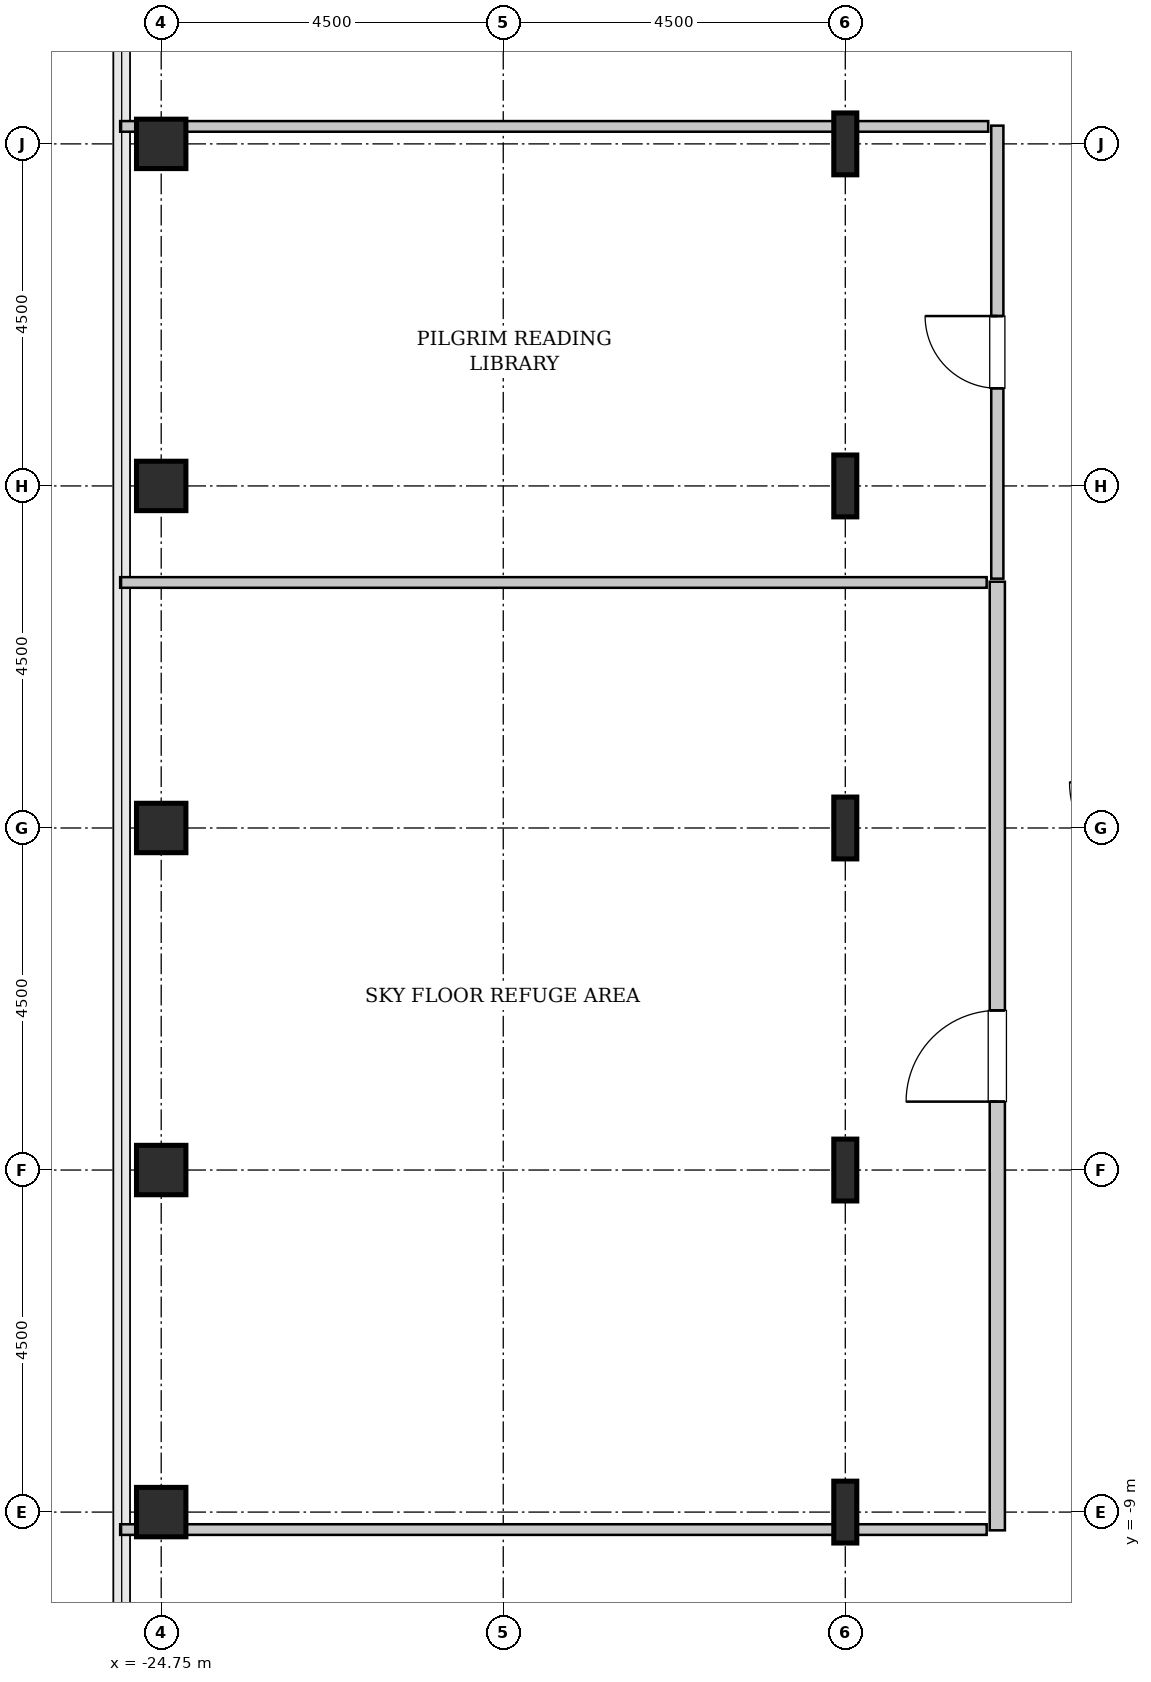
"""IFC4 building model, lengths in metres.
Left out: names, types, materials, properties, quantities, classifications, styles, units other than length and angle.
Written with IfcOpenShell. Run it as: python <this file> out.ifc"""

import sys

from ifc_helpers import new_model, si_unit, direction, frame, frame_2d, origin, origin_2d, place, context, subcontext, project, spatial, rectangle, hollow_rectangle, i_section, extrude, source, transform, mapped, element, fill, save


model = new_model("IFC4")
c1 = context("Model", 3, precision=1e-05, world=origin(), true_north=direction((0.0, 1.0)))
c2 = subcontext(c1, "Body", "Model", "MODEL_VIEW")
j1 = project(units=[si_unit("LENGTHUNIT", "METRE"), si_unit("PLANEANGLEUNIT", "RADIAN")], contexts=[c1])
p1 = place(None, origin())
s1 = spatial("IfcSite", under=j1, at=p1, CompositionType="ELEMENT")
p2 = place(p1, origin())
s2 = spatial("IfcBuilding", under=s1, at=p2, CompositionType="ELEMENT")
p3 = place(p2, frame((0.0, 0.0, 259.8)))
s3 = spatial("IfcBuildingStorey", under=s2, at=p3, CompositionType="ELEMENT", Elevation=259.8)
m1 = source(origin(), c2, "Body", "SweptSolid", [
    extrude(hollow_rectangle(XDim=0.65, YDim=0.65, WallThickness=0.032, InnerFilletRadius=0.032, OuterFilletRadius=0.064, at=origin_2d()), origin(), (0.0, 0.0, 1.0), 4.8),
])
for number, where, z_axis, x_axis in (
    (1, (-24.75, -9.0, 0.0), (0.0, 0.0, 1.0), (1.0, 0.0, 0.0)),
    (2, (-24.75, -4.5, 0.0), (0.0, 0.0, 1.0), (1.0, 0.0, 0.0)),
    (3, (-24.75, 0.0, 0.0), (0.0, 0.0, 1.0), (1.0, 0.0, 0.0)),
    (4, (-24.75, 4.5, 0.0), (0.0, 0.0, 1.0), (1.0, 0.0, 0.0)),
    (5, (-24.75, 9.0, 0.0), (0.0, 0.0, 1.0), (1.0, 0.0, 0.0)),
):
    element("IfcColumn", number, at=place(p3, frame(where, z_axis=z_axis, x_axis=x_axis)), inside=s3, PredefinedType="COLUMN", context=c2, shape_type="MappedRepresentation", body=[
        mapped(m1, transform((0.0, 0.0, 0.0), x_axis=(1.0, 0.0, 0.0), y_axis=(0.0, 1.0, 0.0), z_axis=(0.0, 0.0, 1.0), scale=1.0)),
    ])
m2 = source(origin(), c2, "Body", "SweptSolid", [
    extrude(i_section(OverallWidth=0.303, OverallDepth=0.814, WebThickness=0.021, FlangeThickness=0.04, FilletRadius=0.03, at=origin_2d()), origin(), (0.0, 0.0, 1.0), 4.8),
])
for number, where, z_axis, x_axis in (
    (6, (-15.75, -9.0, 0.0), (0.0, 0.0, 1.0), (1.0, 0.0, 0.0)),
    (7, (-15.75, -4.5, 0.0), (0.0, 0.0, 1.0), (1.0, 0.0, 0.0)),
    (8, (-15.75, 0.0, 0.0), (0.0, 0.0, 1.0), (1.0, 0.0, 0.0)),
    (9, (-15.75, 4.5, 0.0), (0.0, 0.0, 1.0), (1.0, 0.0, 0.0)),
    (10, (-15.75, 9.0, 0.0), (0.0, 0.0, 1.0), (1.0, 0.0, 0.0)),
):
    element("IfcColumn", number, at=place(p3, frame(where, z_axis=z_axis, x_axis=x_axis)), inside=s3, PredefinedType="COLUMN", context=c2, shape_type="MappedRepresentation", body=[
        mapped(m2, transform((0.0, 0.0, 0.0), x_axis=(1.0, 0.0, 0.0), y_axis=(0.0, 1.0, 0.0), z_axis=(0.0, 0.0, 1.0), scale=1.0)),
    ])
m3 = source(origin(), c2, "Body", "SweptSolid", [
    extrude(rectangle(XDim=12.48, YDim=0.2, at=frame_2d((6.24, 0.0))), origin(), (0.0, 0.0, 1.0), 4.535),
])
p4 = place(p3, frame((-13.75, -9.24, 0.0), z_axis=(0.0, 0.0, 1.0), x_axis=(0.0, 1.0, 0.0)))
e11 = element("IfcWall", 11, at=p4, inside=s3, PredefinedType="SOLIDWALL", context=c2, shape_type="MappedRepresentation", body=[
    mapped(m3, transform((0.0, 0.0, 0.0), x_axis=(1.0, 0.0, 0.0), y_axis=(0.0, 1.0, 0.0), z_axis=(0.0, 0.0, 1.0), scale=1.0)),
])
p5 = place(p4, frame((5.64, 0.0, 0.0)))
e12 = element("IfcOpeningElement", 12, at=p5, cuts=e11, PredefinedType="OPENING", context=c2, shape_type="SweptSolid", body=[
    extrude(rectangle(XDim=1.2, YDim=2.15, at=frame_2d((0.6, 1.075))), frame((0.0, 0.11, 0.0), z_axis=(0.0, -1.0, 0.0), x_axis=(1.0, 0.0, 0.0)), (0.0, 0.0, 1.0), 0.22),
])
m4 = source(origin(), c2, "Body", "SweptSolid", [
    extrude(rectangle(XDim=11.4, YDim=0.14, at=frame_2d((5.7, 0.0))), origin(), (0.0, 0.0, 1.0), 3.925),
])
p6 = place(p3, frame((-25.29, -9.23, 0.0), z_axis=(0.0, 0.0, 1.0), x_axis=(1.0, 0.0, 0.0)))
e13 = element("IfcWall", 13, at=p6, inside=s3, PredefinedType="PARTITIONING", context=c2, shape_type="MappedRepresentation", body=[
    mapped(m4, transform((0.0, 0.0, 0.0), x_axis=(1.0, 0.0, 0.0), y_axis=(0.0, 1.0, 0.0), z_axis=(0.0, 0.0, 1.0), scale=1.0)),
])
m5 = source(origin(), c2, "Body", "SweptSolid", [
    extrude(rectangle(XDim=11.4, YDim=0.14, at=frame_2d((5.7, 0.0))), origin(), (0.0, 0.0, 1.0), 4.535),
])
p7 = place(p3, frame((-25.29, 3.23, 0.0), z_axis=(0.0, 0.0, 1.0), x_axis=(1.0, 0.0, 0.0)))
e14 = element("IfcWall", 14, at=p7, inside=s3, PredefinedType="PARTITIONING", context=c2, shape_type="MappedRepresentation", body=[
    mapped(m5, transform((0.0, 0.0, 0.0), x_axis=(1.0, 0.0, 0.0), y_axis=(0.0, 1.0, 0.0), z_axis=(0.0, 0.0, 1.0), scale=1.0)),
])
m6 = source(origin(), c2, "Body", "SweptSolid", [
    extrude(rectangle(XDim=5.96, YDim=0.16, at=frame_2d((2.98, 0.0))), origin(), (0.0, 0.0, 1.0), 4.535),
])
p8 = place(p3, frame((-13.75, 3.28, 0.0), z_axis=(0.0, 0.0, 1.0), x_axis=(0.0, 1.0, 0.0)))
e15 = element("IfcWall", 15, at=p8, inside=s3, PredefinedType="PARTITIONING", context=c2, shape_type="MappedRepresentation", body=[
    mapped(m6, transform((0.0, 0.0, 0.0), x_axis=(1.0, 0.0, 0.0), y_axis=(0.0, 1.0, 0.0), z_axis=(0.0, 0.0, 1.0), scale=1.0)),
])
p9 = place(p8, frame((2.505, 0.0, 0.0)))
e16 = element("IfcOpeningElement", 16, at=p9, cuts=e15, PredefinedType="OPENING", context=c2, shape_type="SweptSolid", body=[
    extrude(rectangle(XDim=0.95, YDim=2.1, at=frame_2d((0.475, 1.05))), frame((0.0, 0.09, 0.0), z_axis=(0.0, -1.0, 0.0), x_axis=(1.0, 0.0, 0.0)), (0.0, 0.0, 1.0), 0.18),
])
m7 = source(origin(), c2, "Body", "SweptSolid", [
    extrude(rectangle(XDim=11.42, YDim=0.14, at=frame_2d((5.71, 0.0))), origin(), (0.0, 0.0, 1.0), 3.925),
])
p10 = place(p3, frame((-25.29, 9.23, 0.0), z_axis=(0.0, 0.0, 1.0), x_axis=(1.0, 0.0, 0.0)))
e17 = element("IfcWall", 17, at=p10, inside=s3, PredefinedType="PARTITIONING", context=c2, shape_type="MappedRepresentation", body=[
    mapped(m7, transform((0.0, 0.0, 0.0), x_axis=(1.0, 0.0, 0.0), y_axis=(0.0, 1.0, 0.0), z_axis=(0.0, 0.0, 1.0), scale=1.0)),
])
m8 = source(origin(), c2, "Body", "SweptSolid", [
    extrude(rectangle(XDim=1.2, YDim=2.15, at=frame_2d((0.6, 1.075))), frame((0.0, 0.025, 0.0), z_axis=(0.0, -1.0, 0.0), x_axis=(1.0, 0.0, 0.0)), (0.0, 0.0, 1.0), 0.05),
])
p11 = place(p5, origin())
e18 = element("IfcDoor", 18, at=p11, inside=s3, OperationType="SINGLE_SWING_LEFT", PredefinedType="DOOR", context=c2, shape_type="MappedRepresentation", body=[
    mapped(m8, transform((0.0, 0.0, 0.0), x_axis=(1.0, 0.0, 0.0), y_axis=(0.0, 1.0, 0.0), z_axis=(0.0, 0.0, 1.0), scale=1.0)),
])
fill(e12, e18)
m9 = source(origin(), c2, "Body", "SweptSolid", [
    extrude(rectangle(XDim=0.95, YDim=2.1, at=frame_2d((0.475, 1.05))), frame((0.0, 0.025, 0.0), z_axis=(0.0, -1.0, 0.0), x_axis=(1.0, 0.0, 0.0)), (0.0, 0.0, 1.0), 0.05),
])
p12 = place(p9, origin())
e19 = element("IfcDoor", 19, at=p12, inside=s3, OperationType="SINGLE_SWING_RIGHT", PredefinedType="DOOR", context=c2, shape_type="MappedRepresentation", body=[
    mapped(m9, transform((0.0, 0.0, 0.0), x_axis=(1.0, 0.0, 0.0), y_axis=(0.0, 1.0, 0.0), z_axis=(0.0, 0.0, 1.0), scale=1.0)),
])
fill(e16, e19)
save(model, sys.argv[1])
